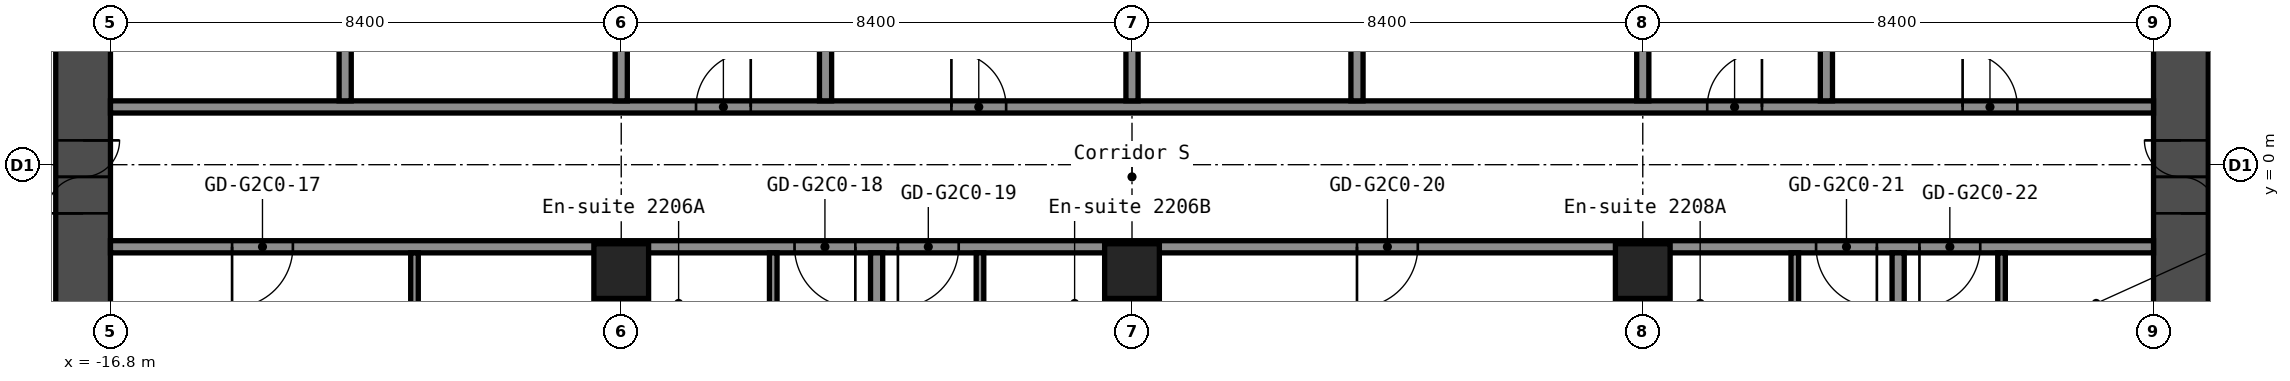
"""IFC4 building model, lengths in metres.
Left out: names, types, materials, properties, quantities, classifications, styles, units other than length and angle.
Written with IfcOpenShell. Run it as: python <this file> out.ifc"""

import sys

from ifc_helpers import new_model, si_unit, direction, frame, frame_2d, origin, origin_2d, place, context, subcontext, project, spatial, rectangle, hollow_rectangle, extrude, element, fill, save


model = new_model("IFC4")
c1 = context("Model", 3, precision=1e-05, world=origin(), true_north=direction((0.0, 1.0)))
c2 = subcontext(c1, "Body", "Model", "MODEL_VIEW")
j1 = project(units=[si_unit("LENGTHUNIT", "METRE"), si_unit("PLANEANGLEUNIT", "RADIAN")], contexts=[c1])
p1 = place(None, origin())
s1 = spatial("IfcSite", under=j1, at=p1, CompositionType="ELEMENT")
p2 = place(p1, origin())
s2 = spatial("IfcBuilding", under=s1, at=p2, CompositionType="ELEMENT")
p3 = place(p2, frame((0.0, 0.0, 81.8)))
s3 = spatial("IfcBuildingStorey", under=s2, at=p3, CompositionType="ELEMENT", Elevation=81.8)
for number, where, z_axis, x_axis in (
    (1, (-8.4, -1.75, 0.0), (0.0, 0.0, 1.0), (1.0, 0.0, 0.0)),
    (2, (0.0, -1.75, 0.0), (0.0, 0.0, 1.0), (1.0, 0.0, 0.0)),
    (3, (8.4, -1.75, 0.0), (0.0, 0.0, 1.0), (1.0, 0.0, 0.0)),
):
    element("IfcColumn", number, at=place(p3, frame(where, z_axis=z_axis, x_axis=x_axis)), inside=s3, PredefinedType="COLUMN", context=c2, shape_type="SweptSolid", body=[
        extrude(hollow_rectangle(XDim=0.9, YDim=0.9, WallThickness=0.036, at=origin_2d()), origin(), (0.0, 0.0, 1.0), 2.8),
    ])
p4 = place(p3, frame((-17.25, -8.4, 0.0), z_axis=(0.0, 0.0, 1.0), x_axis=(0.0, 1.0, 0.0)))
e4 = element("IfcWall", 4, at=p4, inside=s3, PredefinedType="SHEAR", context=c2, shape_type="SweptSolid", body=[
    extrude(rectangle(XDim=16.8, YDim=0.9, at=frame_2d((8.4, 0.0))), origin(), (0.0, 0.0, 1.0), 2.8),
])
p5 = place(p4, frame((7.6, 0.0, 0.0)))
e5 = element("IfcOpeningElement", 5, at=p5, cuts=e4, PredefinedType="OPENING", context=c2, shape_type="SweptSolid", body=[
    extrude(rectangle(XDim=1.2, YDim=2.1, at=frame_2d((0.6, 1.05))), frame((0.0, 0.46, 0.0), z_axis=(0.0, -1.0, 0.0), x_axis=(1.0, 0.0, 0.0)), (0.0, 0.0, 1.0), 0.92),
])
p6 = place(p3, frame((17.25, -8.4, 0.0), z_axis=(0.0, 0.0, 1.0), x_axis=(0.0, 1.0, 0.0)))
e6 = element("IfcWall", 6, at=p6, inside=s3, PredefinedType="SHEAR", context=c2, shape_type="SweptSolid", body=[
    extrude(rectangle(XDim=16.8, YDim=0.9, at=frame_2d((8.4, 0.0))), origin(), (0.0, 0.0, 1.0), 2.8),
])
p7 = place(p6, frame((7.6, 0.0, 0.0)))
e7 = element("IfcOpeningElement", 7, at=p7, cuts=e6, PredefinedType="OPENING", context=c2, shape_type="SweptSolid", body=[
    extrude(rectangle(XDim=1.2, YDim=2.1, at=frame_2d((0.6, 1.05))), frame((0.0, 0.46, 0.0), z_axis=(0.0, -1.0, 0.0), x_axis=(1.0, 0.0, 0.0)), (0.0, 0.0, 1.0), 0.92),
])
p8 = place(p3, frame((-16.8, -1.35, 0.0), z_axis=(0.0, 0.0, 1.0), x_axis=(1.0, 0.0, 0.0)))
e8 = element("IfcWall", 8, at=p8, inside=s3, PredefinedType="PARTITIONING", context=c2, shape_type="SweptSolid", body=[
    extrude(rectangle(XDim=33.6, YDim=0.2, at=frame_2d((16.8, 0.0))), origin(), (0.0, 0.0, 1.0), 2.8),
])
p9 = place(p8, frame((2.0, 0.0, 0.0)))
e9 = element("IfcOpeningElement", 9, at=p9, cuts=e8, PredefinedType="OPENING", context=c2, shape_type="SweptSolid", body=[
    extrude(rectangle(XDim=1.0, YDim=2.1, at=frame_2d((0.5, 1.05))), frame((0.0, 0.11, 0.0), z_axis=(0.0, -1.0, 0.0), x_axis=(1.0, 0.0, 0.0)), (0.0, 0.0, 1.0), 0.22),
])
p10 = place(p8, frame((11.25, 0.0, 0.0)))
e10 = element("IfcOpeningElement", 10, at=p10, cuts=e8, PredefinedType="OPENING", context=c2, shape_type="SweptSolid", body=[
    extrude(rectangle(XDim=1.0, YDim=2.1, at=frame_2d((0.5, 1.05))), frame((0.0, 0.11, 0.0), z_axis=(0.0, -1.0, 0.0), x_axis=(1.0, 0.0, 0.0)), (0.0, 0.0, 1.0), 0.22),
])
p11 = place(p8, frame((12.95, 0.0, 0.0)))
e11 = element("IfcOpeningElement", 11, at=p11, cuts=e8, PredefinedType="OPENING", context=c2, shape_type="SweptSolid", body=[
    extrude(rectangle(XDim=1.0, YDim=2.1, at=frame_2d((0.5, 1.05))), frame((0.0, 0.11, 0.0), z_axis=(0.0, -1.0, 0.0), x_axis=(1.0, 0.0, 0.0)), (0.0, 0.0, 1.0), 0.22),
])
p12 = place(p8, frame((20.5, 0.0, 0.0)))
e12 = element("IfcOpeningElement", 12, at=p12, cuts=e8, PredefinedType="OPENING", context=c2, shape_type="SweptSolid", body=[
    extrude(rectangle(XDim=1.0, YDim=2.1, at=frame_2d((0.5, 1.05))), frame((0.0, 0.11, 0.0), z_axis=(0.0, -1.0, 0.0), x_axis=(1.0, 0.0, 0.0)), (0.0, 0.0, 1.0), 0.22),
])
p13 = place(p8, frame((28.05, 0.0, 0.0)))
e13 = element("IfcOpeningElement", 13, at=p13, cuts=e8, PredefinedType="OPENING", context=c2, shape_type="SweptSolid", body=[
    extrude(rectangle(XDim=1.0, YDim=2.1, at=frame_2d((0.5, 1.05))), frame((0.0, 0.11, 0.0), z_axis=(0.0, -1.0, 0.0), x_axis=(1.0, 0.0, 0.0)), (0.0, 0.0, 1.0), 0.22),
])
p14 = place(p8, frame((29.75, 0.0, 0.0)))
e14 = element("IfcOpeningElement", 14, at=p14, cuts=e8, PredefinedType="OPENING", context=c2, shape_type="SweptSolid", body=[
    extrude(rectangle(XDim=1.0, YDim=2.1, at=frame_2d((0.5, 1.05))), frame((0.0, 0.11, 0.0), z_axis=(0.0, -1.0, 0.0), x_axis=(1.0, 0.0, 0.0)), (0.0, 0.0, 1.0), 0.22),
])
p15 = place(p3, frame((-16.8, 0.95, 0.0), z_axis=(0.0, 0.0, 1.0), x_axis=(1.0, 0.0, 0.0)))
e15 = element("IfcWall", 15, at=p15, inside=s3, PredefinedType="PARTITIONING", context=c2, shape_type="SweptSolid", body=[
    extrude(rectangle(XDim=33.6, YDim=0.2, at=frame_2d((16.8, 0.0))), origin(), (0.0, 0.0, 1.0), 2.8),
])
p16 = place(p15, frame((9.63, 0.0, 0.0)))
e16 = element("IfcOpeningElement", 16, at=p16, cuts=e15, PredefinedType="OPENING", context=c2, shape_type="SweptSolid", body=[
    extrude(rectangle(XDim=0.9, YDim=2.1, at=frame_2d((0.45, 1.05))), frame((0.0, 0.11, 0.0), z_axis=(0.0, -1.0, 0.0), x_axis=(1.0, 0.0, 0.0)), (0.0, 0.0, 1.0), 0.22),
])
p17 = place(p15, frame((13.83, 0.0, 0.0)))
e17 = element("IfcOpeningElement", 17, at=p17, cuts=e15, PredefinedType="OPENING", context=c2, shape_type="SweptSolid", body=[
    extrude(rectangle(XDim=0.9, YDim=2.1, at=frame_2d((0.45, 1.05))), frame((0.0, 0.11, 0.0), z_axis=(0.0, -1.0, 0.0), x_axis=(1.0, 0.0, 0.0)), (0.0, 0.0, 1.0), 0.22),
])
p18 = place(p15, frame((26.26, 0.0, 0.0)))
e18 = element("IfcOpeningElement", 18, at=p18, cuts=e15, PredefinedType="OPENING", context=c2, shape_type="SweptSolid", body=[
    extrude(rectangle(XDim=0.9, YDim=2.1, at=frame_2d((0.45, 1.05))), frame((0.0, 0.11, 0.0), z_axis=(0.0, -1.0, 0.0), x_axis=(1.0, 0.0, 0.0)), (0.0, 0.0, 1.0), 0.22),
])
p19 = place(p15, frame((30.46, 0.0, 0.0)))
e19 = element("IfcOpeningElement", 19, at=p19, cuts=e15, PredefinedType="OPENING", context=c2, shape_type="SweptSolid", body=[
    extrude(rectangle(XDim=0.9, YDim=2.1, at=frame_2d((0.45, 1.05))), frame((0.0, 0.11, 0.0), z_axis=(0.0, -1.0, 0.0), x_axis=(1.0, 0.0, 0.0)), (0.0, 0.0, 1.0), 0.22),
])
p20 = place(p3, frame((-12.94, 1.05, 0.0), z_axis=(0.0, 0.0, 1.0), x_axis=(0.0, 1.0, 0.0)))
e20 = element("IfcWall", 20, at=p20, inside=s3, PredefinedType="PARTITIONING", context=c2, shape_type="SweptSolid", body=[
    extrude(rectangle(XDim=5.9, YDim=0.2, at=frame_2d((2.95, 0.0))), origin(), (0.0, 0.0, 1.0), 2.8),
])
p21 = place(p3, frame((-11.8, -4.75, 0.0), z_axis=(0.0, 0.0, 1.0), x_axis=(0.0, 1.0, 0.0)))
e21 = element("IfcWall", 21, at=p21, inside=s3, PredefinedType="PARTITIONING", context=c2, shape_type="SweptSolid", body=[
    extrude(rectangle(XDim=3.3, YDim=0.125, at=frame_2d((1.65, 0.0))), origin(), (0.0, 0.0, 1.0), 2.8),
])
p22 = place(p3, frame((-8.4, -15.55, 0.0), z_axis=(0.0, 0.0, 1.0), x_axis=(0.0, 1.0, 0.0)))
e22 = element("IfcWall", 22, at=p22, inside=s3, PredefinedType="PARTITIONING", context=c2, shape_type="SweptSolid", body=[
    extrude(rectangle(XDim=13.36, YDim=0.2, at=frame_2d((6.68, 0.0))), origin(), (0.0, 0.0, 1.0), 2.8),
])
p23 = place(p3, frame((-8.4, 1.05, 0.0), z_axis=(0.0, 0.0, 1.0), x_axis=(0.0, 1.0, 0.0)))
e23 = element("IfcWall", 23, at=p23, inside=s3, PredefinedType="PARTITIONING", context=c2, shape_type="SweptSolid", body=[
    extrude(rectangle(XDim=5.9, YDim=0.2, at=frame_2d((2.95, 0.0))), origin(), (0.0, 0.0, 1.0), 2.8),
])
p24 = place(p3, frame((-5.9, -4.35, 0.0), z_axis=(0.0, 0.0, 1.0), x_axis=(0.0, 1.0, 0.0)))
e24 = element("IfcWall", 24, at=p24, inside=s3, PredefinedType="PARTITIONING", context=c2, shape_type="SweptSolid", body=[
    extrude(rectangle(XDim=2.9, YDim=0.125, at=frame_2d((1.45, 0.0))), origin(), (0.0, 0.0, 1.0), 2.8),
])
p25 = place(p24, frame((0.6, 0.0, 0.0)))
e25 = element("IfcOpeningElement", 25, at=p25, cuts=e24, PredefinedType="OPENING", context=c2, shape_type="SweptSolid", body=[
    extrude(rectangle(XDim=0.8, YDim=2.1, at=frame_2d((0.4, 1.05))), frame((0.0, 0.073, 0.0), z_axis=(0.0, -1.0, 0.0), x_axis=(1.0, 0.0, 0.0)), (0.0, 0.0, 1.0), 0.145),
])
p26 = place(p3, frame((-5.04, 1.05, 0.0), z_axis=(0.0, 0.0, 1.0), x_axis=(0.0, 1.0, 0.0)))
e26 = element("IfcWall", 26, at=p26, inside=s3, PredefinedType="PARTITIONING", context=c2, shape_type="SweptSolid", body=[
    extrude(rectangle(XDim=5.9, YDim=0.2, at=frame_2d((2.95, 0.0))), origin(), (0.0, 0.0, 1.0), 2.8),
])
p27 = place(p3, frame((-4.2, -15.55, 0.0), z_axis=(0.0, 0.0, 1.0), x_axis=(0.0, 1.0, 0.0)))
e27 = element("IfcWall", 27, at=p27, inside=s3, PredefinedType="PARTITIONING", context=c2, shape_type="SweptSolid", body=[
    extrude(rectangle(XDim=14.1, YDim=0.2, at=frame_2d((7.05, 0.0))), origin(), (0.0, 0.0, 1.0), 2.8),
])
p28 = place(p3, frame((-2.5, -4.35, 0.0), z_axis=(0.0, 0.0, 1.0), x_axis=(0.0, 1.0, 0.0)))
e28 = element("IfcWall", 28, at=p28, inside=s3, PredefinedType="PARTITIONING", context=c2, shape_type="SweptSolid", body=[
    extrude(rectangle(XDim=2.9, YDim=0.125, at=frame_2d((1.45, 0.0))), origin(), (0.0, 0.0, 1.0), 2.8),
])
p29 = place(p28, frame((0.6, 0.0, 0.0)))
e29 = element("IfcOpeningElement", 29, at=p29, cuts=e28, PredefinedType="OPENING", context=c2, shape_type="SweptSolid", body=[
    extrude(rectangle(XDim=0.8, YDim=2.1, at=frame_2d((0.4, 1.05))), frame((0.0, 0.073, 0.0), z_axis=(0.0, -1.0, 0.0), x_axis=(1.0, 0.0, 0.0)), (0.0, 0.0, 1.0), 0.145),
])
p30 = place(p3, frame((0.0, -15.55, 0.0), z_axis=(0.0, 0.0, 1.0), x_axis=(0.0, 1.0, 0.0)))
e30 = element("IfcWall", 30, at=p30, inside=s3, PredefinedType="PARTITIONING", context=c2, shape_type="SweptSolid", body=[
    extrude(rectangle(XDim=13.36, YDim=0.2, at=frame_2d((6.68, 0.0))), origin(), (0.0, 0.0, 1.0), 2.8),
])
for number, where, z_axis, x_axis in (
    (31, (0.0, 1.05, 0.0), (0.0, 0.0, 1.0), (0.0, 1.0, 0.0)),
    (32, (3.7, 1.05, 0.0), (0.0, 0.0, 1.0), (0.0, 1.0, 0.0)),
):
    element("IfcWall", number, at=place(p3, frame(where, z_axis=z_axis, x_axis=x_axis)), inside=s3, PredefinedType="PARTITIONING", context=c2, shape_type="SweptSolid", body=[
        extrude(rectangle(XDim=5.9, YDim=0.2, at=frame_2d((2.95, 0.0))), origin(), (0.0, 0.0, 1.0), 2.8),
    ])
p31 = place(p3, frame((8.4, -15.55, 0.0), z_axis=(0.0, 0.0, 1.0), x_axis=(0.0, 1.0, 0.0)))
e33 = element("IfcWall", 33, at=p31, inside=s3, PredefinedType="PARTITIONING", context=c2, shape_type="SweptSolid", body=[
    extrude(rectangle(XDim=13.36, YDim=0.2, at=frame_2d((6.68, 0.0))), origin(), (0.0, 0.0, 1.0), 2.8),
])
p32 = place(p3, frame((8.4, 1.05, 0.0), z_axis=(0.0, 0.0, 1.0), x_axis=(0.0, 1.0, 0.0)))
e34 = element("IfcWall", 34, at=p32, inside=s3, PredefinedType="PARTITIONING", context=c2, shape_type="SweptSolid", body=[
    extrude(rectangle(XDim=5.9, YDim=0.2, at=frame_2d((2.95, 0.0))), origin(), (0.0, 0.0, 1.0), 2.8),
])
p33 = place(p3, frame((10.9, -4.35, 0.0), z_axis=(0.0, 0.0, 1.0), x_axis=(0.0, 1.0, 0.0)))
e35 = element("IfcWall", 35, at=p33, inside=s3, PredefinedType="PARTITIONING", context=c2, shape_type="SweptSolid", body=[
    extrude(rectangle(XDim=2.9, YDim=0.125, at=frame_2d((1.45, 0.0))), origin(), (0.0, 0.0, 1.0), 2.8),
])
p34 = place(p33, frame((0.6, 0.0, 0.0)))
e36 = element("IfcOpeningElement", 36, at=p34, cuts=e35, PredefinedType="OPENING", context=c2, shape_type="SweptSolid", body=[
    extrude(rectangle(XDim=0.8, YDim=2.1, at=frame_2d((0.4, 1.05))), frame((0.0, 0.073, 0.0), z_axis=(0.0, -1.0, 0.0), x_axis=(1.0, 0.0, 0.0)), (0.0, 0.0, 1.0), 0.145),
])
p35 = place(p3, frame((11.42, 1.05, 0.0), z_axis=(0.0, 0.0, 1.0), x_axis=(0.0, 1.0, 0.0)))
e37 = element("IfcWall", 37, at=p35, inside=s3, PredefinedType="PARTITIONING", context=c2, shape_type="SweptSolid", body=[
    extrude(rectangle(XDim=5.9, YDim=0.2, at=frame_2d((2.95, 0.0))), origin(), (0.0, 0.0, 1.0), 2.8),
])
p36 = place(p3, frame((12.6, -15.55, 0.0), z_axis=(0.0, 0.0, 1.0), x_axis=(0.0, 1.0, 0.0)))
e38 = element("IfcWall", 38, at=p36, inside=s3, PredefinedType="PARTITIONING", context=c2, shape_type="SweptSolid", body=[
    extrude(rectangle(XDim=14.1, YDim=0.2, at=frame_2d((7.05, 0.0))), origin(), (0.0, 0.0, 1.0), 2.8),
])
p37 = place(p3, frame((14.3, -4.35, 0.0), z_axis=(0.0, 0.0, 1.0), x_axis=(0.0, 1.0, 0.0)))
e39 = element("IfcWall", 39, at=p37, inside=s3, PredefinedType="PARTITIONING", context=c2, shape_type="SweptSolid", body=[
    extrude(rectangle(XDim=2.9, YDim=0.125, at=frame_2d((1.45, 0.0))), origin(), (0.0, 0.0, 1.0), 2.8),
])
p38 = place(p37, frame((0.6, 0.0, 0.0)))
e40 = element("IfcOpeningElement", 40, at=p38, cuts=e39, PredefinedType="OPENING", context=c2, shape_type="SweptSolid", body=[
    extrude(rectangle(XDim=0.8, YDim=2.1, at=frame_2d((0.4, 1.05))), frame((0.0, 0.073, 0.0), z_axis=(0.0, -1.0, 0.0), x_axis=(1.0, 0.0, 0.0)), (0.0, 0.0, 1.0), 0.145),
])
p39 = place(p5, origin())
e41 = element("IfcDoor", 41, at=p39, inside=s3, OperationType="DOUBLE_DOOR_SINGLE_SWING", PredefinedType="DOOR", context=c2, shape_type="SweptSolid", body=[
    extrude(rectangle(XDim=1.2, YDim=2.1, at=frame_2d((0.6, 1.05))), frame((0.0, 0.025, 0.0), z_axis=(0.0, -1.0, 0.0), x_axis=(1.0, 0.0, 0.0)), (0.0, 0.0, 1.0), 0.05),
])
fill(e5, e41)
p40 = place(p7, origin())
e42 = element("IfcDoor", 42, at=p40, inside=s3, OperationType="DOUBLE_DOOR_SINGLE_SWING", PredefinedType="DOOR", context=c2, shape_type="SweptSolid", body=[
    extrude(rectangle(XDim=1.2, YDim=2.1, at=frame_2d((0.6, 1.05))), frame((0.0, 0.025, 0.0), z_axis=(0.0, -1.0, 0.0), x_axis=(1.0, 0.0, 0.0)), (0.0, 0.0, 1.0), 0.05),
])
fill(e7, e42)
p41 = place(p9, origin())
e43 = element("IfcDoor", 43, at=p41, inside=s3, OperationType="SINGLE_SWING_LEFT", PredefinedType="DOOR", context=c2, shape_type="SweptSolid", body=[
    extrude(rectangle(XDim=1.0, YDim=2.1, at=frame_2d((0.5, 1.05))), frame((0.0, 0.025, 0.0), z_axis=(0.0, -1.0, 0.0), x_axis=(1.0, 0.0, 0.0)), (0.0, 0.0, 1.0), 0.05),
])
fill(e9, e43)
p42 = place(p10, origin())
e44 = element("IfcDoor", 44, at=p42, inside=s3, OperationType="SINGLE_SWING_RIGHT", PredefinedType="DOOR", context=c2, shape_type="SweptSolid", body=[
    extrude(rectangle(XDim=1.0, YDim=2.1, at=frame_2d((0.5, 1.05))), frame((0.0, 0.025, 0.0), z_axis=(0.0, -1.0, 0.0), x_axis=(1.0, 0.0, 0.0)), (0.0, 0.0, 1.0), 0.05),
])
fill(e10, e44)
p43 = place(p11, origin())
e45 = element("IfcDoor", 45, at=p43, inside=s3, OperationType="SINGLE_SWING_LEFT", PredefinedType="DOOR", context=c2, shape_type="SweptSolid", body=[
    extrude(rectangle(XDim=1.0, YDim=2.1, at=frame_2d((0.5, 1.05))), frame((0.0, 0.025, 0.0), z_axis=(0.0, -1.0, 0.0), x_axis=(1.0, 0.0, 0.0)), (0.0, 0.0, 1.0), 0.05),
])
fill(e11, e45)
p44 = place(p12, origin())
e46 = element("IfcDoor", 46, at=p44, inside=s3, OperationType="SINGLE_SWING_LEFT", PredefinedType="DOOR", context=c2, shape_type="SweptSolid", body=[
    extrude(rectangle(XDim=1.0, YDim=2.1, at=frame_2d((0.5, 1.05))), frame((0.0, 0.025, 0.0), z_axis=(0.0, -1.0, 0.0), x_axis=(1.0, 0.0, 0.0)), (0.0, 0.0, 1.0), 0.05),
])
fill(e12, e46)
p45 = place(p13, origin())
e47 = element("IfcDoor", 47, at=p45, inside=s3, OperationType="SINGLE_SWING_RIGHT", PredefinedType="DOOR", context=c2, shape_type="SweptSolid", body=[
    extrude(rectangle(XDim=1.0, YDim=2.1, at=frame_2d((0.5, 1.05))), frame((0.0, 0.025, 0.0), z_axis=(0.0, -1.0, 0.0), x_axis=(1.0, 0.0, 0.0)), (0.0, 0.0, 1.0), 0.05),
])
fill(e13, e47)
p46 = place(p14, origin())
e48 = element("IfcDoor", 48, at=p46, inside=s3, OperationType="SINGLE_SWING_LEFT", PredefinedType="DOOR", context=c2, shape_type="SweptSolid", body=[
    extrude(rectangle(XDim=1.0, YDim=2.1, at=frame_2d((0.5, 1.05))), frame((0.0, 0.025, 0.0), z_axis=(0.0, -1.0, 0.0), x_axis=(1.0, 0.0, 0.0)), (0.0, 0.0, 1.0), 0.05),
])
fill(e14, e48)
p47 = place(p16, origin())
e49 = element("IfcDoor", 49, at=p47, inside=s3, OperationType="SINGLE_SWING_LEFT", PredefinedType="DOOR", context=c2, shape_type="SweptSolid", body=[
    extrude(rectangle(XDim=0.9, YDim=2.1, at=frame_2d((0.45, 1.05))), frame((0.0, 0.025, 0.0), z_axis=(0.0, -1.0, 0.0), x_axis=(1.0, 0.0, 0.0)), (0.0, 0.0, 1.0), 0.05),
])
fill(e16, e49)
p48 = place(p17, origin())
e50 = element("IfcDoor", 50, at=p48, inside=s3, OperationType="SINGLE_SWING_RIGHT", PredefinedType="DOOR", context=c2, shape_type="SweptSolid", body=[
    extrude(rectangle(XDim=0.9, YDim=2.1, at=frame_2d((0.45, 1.05))), frame((0.0, 0.025, 0.0), z_axis=(0.0, -1.0, 0.0), x_axis=(1.0, 0.0, 0.0)), (0.0, 0.0, 1.0), 0.05),
])
fill(e17, e50)
p49 = place(p18, origin())
e51 = element("IfcDoor", 51, at=p49, inside=s3, OperationType="SINGLE_SWING_LEFT", PredefinedType="DOOR", context=c2, shape_type="SweptSolid", body=[
    extrude(rectangle(XDim=0.9, YDim=2.1, at=frame_2d((0.45, 1.05))), frame((0.0, 0.025, 0.0), z_axis=(0.0, -1.0, 0.0), x_axis=(1.0, 0.0, 0.0)), (0.0, 0.0, 1.0), 0.05),
])
fill(e18, e51)
p50 = place(p19, origin())
e52 = element("IfcDoor", 52, at=p50, inside=s3, OperationType="SINGLE_SWING_RIGHT", PredefinedType="DOOR", context=c2, shape_type="SweptSolid", body=[
    extrude(rectangle(XDim=0.9, YDim=2.1, at=frame_2d((0.45, 1.05))), frame((0.0, 0.025, 0.0), z_axis=(0.0, -1.0, 0.0), x_axis=(1.0, 0.0, 0.0)), (0.0, 0.0, 1.0), 0.05),
])
fill(e19, e52)
save(model, sys.argv[1])
